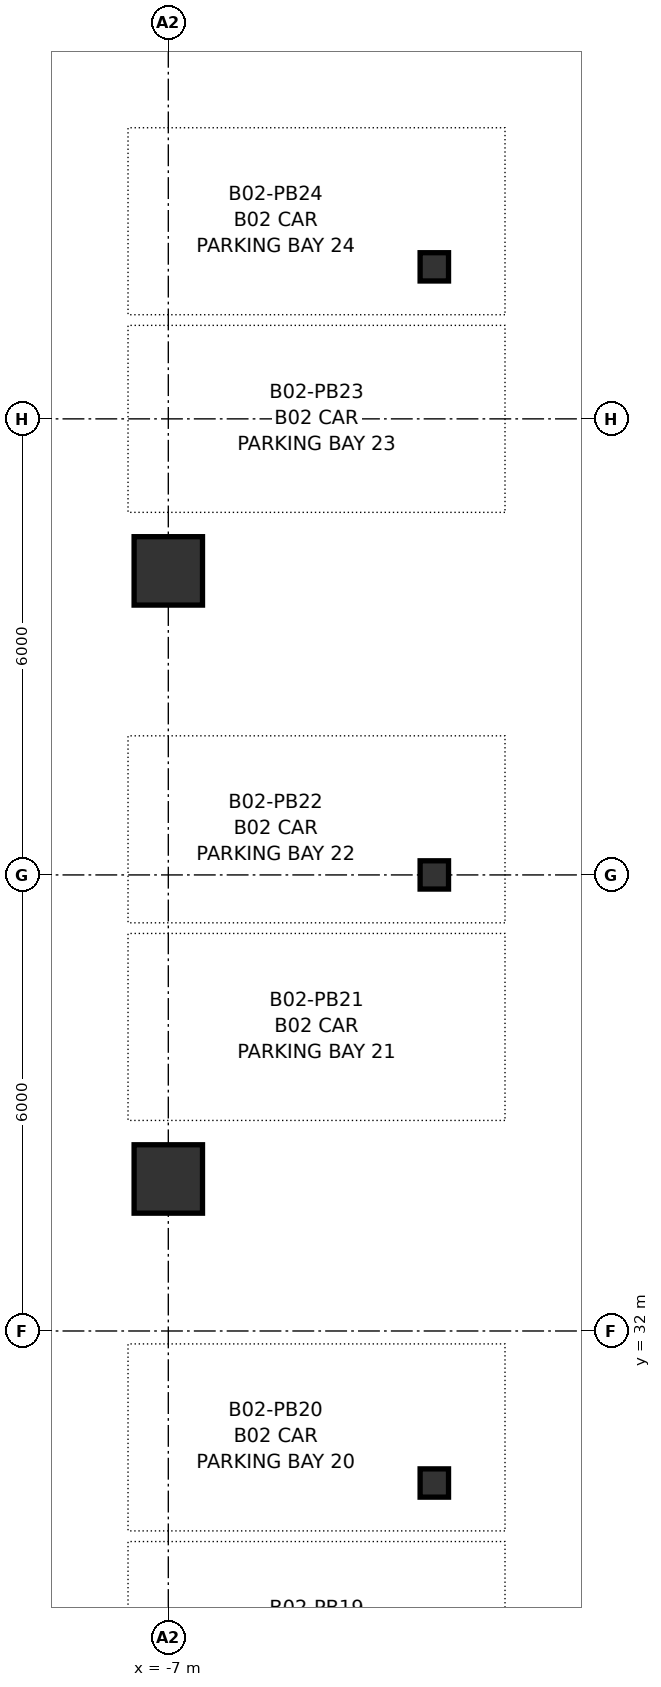
"""IFC4 building model, lengths in metres.
Left out: names, types, materials, properties, quantities, classifications, styles, units other than length and angle.
Written with IfcOpenShell. Run it as: python <this file> out.ifc"""

import sys

from ifc_helpers import new_model, si_unit, direction, frame, origin, origin_2d, place, context, subcontext, project, spatial, rectangle, i_section, extrude, source, transform, mapped, element, save


model = new_model("IFC4")
c1 = context("Model", 3, precision=1e-05, world=origin(), true_north=direction((0.0, 1.0)))
c2 = subcontext(c1, "Body", "Model", "MODEL_VIEW")
j1 = project(units=[si_unit("LENGTHUNIT", "METRE"), si_unit("PLANEANGLEUNIT", "RADIAN")], contexts=[c1])
p1 = place(None, origin())
s1 = spatial("IfcSite", under=j1, at=p1, CompositionType="ELEMENT")
p2 = place(p1, origin())
s2 = spatial("IfcBuilding", under=s1, at=p2, CompositionType="ELEMENT")
p3 = place(p2, frame((0.0, 0.0, -8.7)))
s3 = spatial("IfcBuildingStorey", under=s2, at=p3, CompositionType="ELEMENT", Elevation=-8.7)
m1 = source(origin(), c2, "Body", "SweptSolid", [
    extrude(i_section(OverallWidth=0.374, OverallDepth=0.372, WebThickness=0.016, FlangeThickness=0.026, FilletRadius=0.015, at=origin_2d()), origin(), (0.0, 0.0, 1.0), 4.2),
])
for number, where, z_axis, x_axis in (
    (1, (-3.5, 30.0, 0.0), (0.0, 0.0, 1.0), (1.0, 0.0, 0.0)),
    (2, (-3.5, 38.0, 0.0), (0.0, 0.0, 1.0), (1.0, 0.0, 0.0)),
    (3, (-3.5, 46.0, 0.0), (0.0, 0.0, 1.0), (1.0, 0.0, 0.0)),
):
    element("IfcColumn", number, at=place(p3, frame(where, z_axis=z_axis, x_axis=x_axis)), inside=s3, PredefinedType="PILASTER", context=c2, shape_type="MappedRepresentation", body=[
        mapped(m1, transform((0.0, 0.0, 0.0), x_axis=(1.0, 0.0, 0.0), y_axis=(0.0, 1.0, 0.0), z_axis=(0.0, 0.0, 1.0), scale=1.0)),
    ])
m2 = source(origin(), c2, "Body", "SweptSolid", [
    extrude(rectangle(XDim=0.9, YDim=0.9, at=origin_2d()), origin(), (0.0, 0.0, 1.0), 4.2),
])
for number, where, z_axis, x_axis in (
    (4, (-7.0, 34.0, 0.0), (0.0, 0.0, 1.0), (1.0, 0.0, 0.0)),
    (5, (-7.0, 42.0, 0.0), (0.0, 0.0, 1.0), (1.0, 0.0, 0.0)),
):
    element("IfcColumn", number, at=place(p3, frame(where, z_axis=z_axis, x_axis=x_axis)), inside=s3, PredefinedType="COLUMN", context=c2, shape_type="MappedRepresentation", body=[
        mapped(m2, transform((0.0, 0.0, 0.0), x_axis=(1.0, 0.0, 0.0), y_axis=(0.0, 1.0, 0.0), z_axis=(0.0, 0.0, 1.0), scale=1.0)),
    ])
save(model, sys.argv[1])
